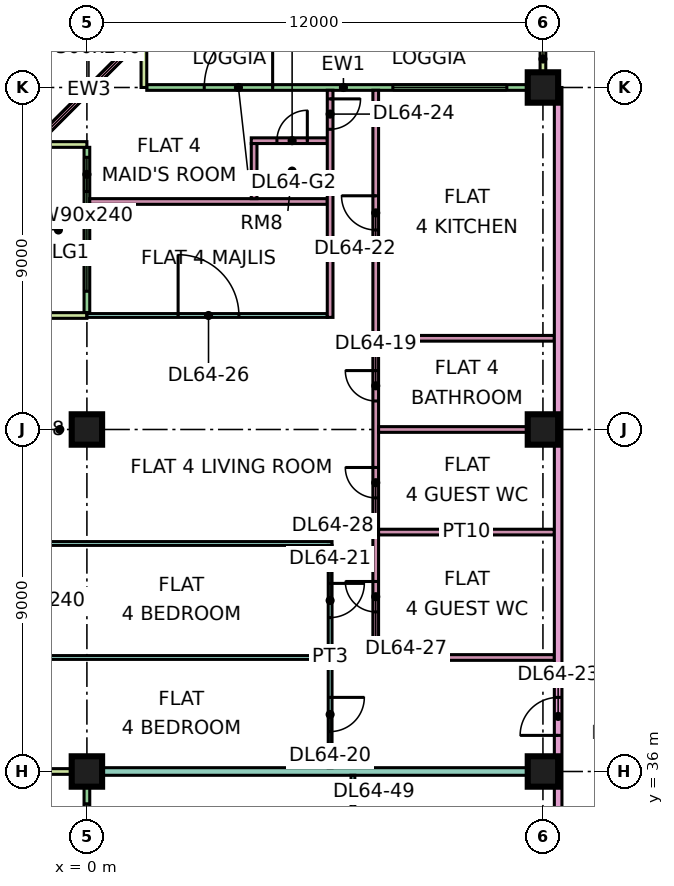
"""IFC4 building model, lengths in metres.
Left out: names, types, materials, properties, quantities, classifications, styles, units other than length and angle.
Written with IfcOpenShell. Run it as: python <this file> out.ifc"""

import sys

from ifc_helpers import new_model, si_unit, direction, frame, frame_2d, origin, origin_2d, place, context, subcontext, project, spatial, rectangle, extrude, element, fill, save


model = new_model("IFC4")
c1 = context("Model", 3, precision=1e-05, world=origin(), true_north=direction((0.0, 1.0)))
c2 = subcontext(c1, "Body", "Model", "MODEL_VIEW")
j1 = project(units=[si_unit("LENGTHUNIT", "METRE"), si_unit("PLANEANGLEUNIT", "RADIAN")], contexts=[c1])
p1 = place(None, origin())
s1 = spatial("IfcSite", under=j1, at=p1, CompositionType="ELEMENT")
p2 = place(p1, origin())
s2 = spatial("IfcBuilding", under=s1, at=p2, CompositionType="ELEMENT")
p3 = place(p2, frame((0.0, 0.0, 277.15)))
s3 = spatial("IfcBuildingStorey", under=s2, at=p3, CompositionType="ELEMENT", Elevation=277.15)
p4 = place(p3, frame((0.0, 36.0, 0.0), z_axis=(0.0, 0.0, 1.0), x_axis=(1.0, 0.0, 0.0)))
e1 = element("IfcColumn", 1, at=p4, inside=s3, PredefinedType="COLUMN", context=c2, shape_type="SweptSolid", body=[
    extrude(rectangle(XDim=0.8, YDim=0.8, at=origin_2d()), origin(), (0.0, 0.0, 1.0), 3.75),
])
for number, where, z_axis, x_axis in (
    (2, (0.0, 45.0, 0.0), (0.0, 0.0, 1.0), (1.0, 0.0, 0.0)),
    (3, (12.0, 36.0, 0.0), (0.0, 0.0, 1.0), (1.0, 0.0, 0.0)),
    (4, (12.0, 45.0, 0.0), (0.0, 0.0, 1.0), (1.0, 0.0, 0.0)),
    (5, (12.0, 54.0, 0.0), (0.0, 0.0, 1.0), (1.0, 0.0, 0.0)),
):
    element("IfcColumn", number, at=place(p3, frame(where, z_axis=z_axis, x_axis=x_axis)), inside=s3, PredefinedType="COLUMN", context=c2, shape_type="SweptSolid", body=[
        extrude(rectangle(XDim=0.8, YDim=0.8, at=origin_2d()), origin(), (0.0, 0.0, 1.0), 3.75),
    ])
p5 = place(p3, frame((11.925, 54.0, 0.0), z_axis=(0.0, 0.0, 1.0), x_axis=(-1.0, 0.0, 0.0)))
e6 = element("IfcWall", 6, at=p5, inside=s3, PredefinedType="SOLIDWALL", context=c2, shape_type="SweptSolid", body=[
    extrude(rectangle(XDim=10.35, YDim=0.15, at=frame_2d((5.175, 0.0))), origin(), (0.0, 0.0, 1.0), 3.35),
])
p6 = place(p5, frame((0.875, 0.0, 0.45)))
e7 = element("IfcOpeningElement", 7, at=p6, cuts=e6, PredefinedType="OPENING", context=c2, shape_type="SweptSolid", body=[
    extrude(rectangle(XDim=3.0, YDim=2.4, at=frame_2d((1.5, 1.2))), frame((0.0, 0.085, 0.0), z_axis=(0.0, -1.0, 0.0), x_axis=(1.0, 0.0, 0.0)), (0.0, 0.0, 1.0), 0.17),
])
p7 = place(p5, frame((7.038, 0.0, 0.0)))
e8 = element("IfcOpeningElement", 8, at=p7, cuts=e6, PredefinedType="OPENING", context=c2, shape_type="SweptSolid", body=[
    extrude(rectangle(XDim=1.8, YDim=2.4, at=frame_2d((0.9, 1.2))), frame((0.0, 0.085, 0.0), z_axis=(0.0, -1.0, 0.0), x_axis=(1.0, 0.0, 0.0)), (0.0, 0.0, 1.0), 0.17),
])
for number, where, z_axis, x_axis in (
    (9, (12.0, 55.5, 0.0), (0.0, 0.0, 1.0), (0.0, -1.0, 0.0)),
    (10, (1.5, 55.5, 0.0), (0.0, 0.0, 1.0), (0.0, -1.0, 0.0)),
):
    element("IfcWall", number, at=place(p3, frame(where, z_axis=z_axis, x_axis=x_axis)), inside=s3, PredefinedType="SOLIDWALL", context=c2, shape_type="SweptSolid", body=[
        extrude(rectangle(XDim=1.5, YDim=0.15, at=frame_2d((0.75, 0.0))), origin(), (0.0, 0.0, 1.0), 3.35),
    ])
p8 = place(p3, frame((1.553, 55.447, 0.0), z_axis=(0.0, 0.0, 1.0), x_axis=(-0.707106781187, -0.707106781187, 0.0)))
e11 = element("IfcWall", 11, at=p8, inside=s3, PredefinedType="SOLIDWALL", context=c2, shape_type="SweptSolid", body=[
    extrude(rectangle(XDim=4.243, YDim=0.15, at=frame_2d((2.121, 0.0))), origin(), (0.0, 0.0, 1.0), 3.35),
])
p9 = place(p8, frame((0.621, 0.0, 0.45)))
e12 = element("IfcOpeningElement", 12, at=p9, cuts=e11, PredefinedType="OPENING", context=c2, shape_type="SweptSolid", body=[
    extrude(rectangle(XDim=3.0, YDim=2.4, at=frame_2d((1.5, 1.2))), frame((0.0, 0.085, 0.0), z_axis=(0.0, -1.0, 0.0), x_axis=(1.0, 0.0, 0.0)), (0.0, 0.0, 1.0), 0.17),
])
p10 = place(p3, frame((0.0, 52.425, 0.0), z_axis=(0.0, 0.0, 1.0), x_axis=(0.0, -1.0, 0.0)))
e13 = element("IfcWall", 13, at=p10, inside=s3, PredefinedType="SOLIDWALL", context=c2, shape_type="SweptSolid", body=[
    extrude(rectangle(XDim=4.35, YDim=0.15, at=frame_2d((2.175, 0.0))), origin(), (0.0, 0.0, 1.0), 3.35),
])
p11 = place(p10, frame((0.262, 0.0, 0.45)))
e14 = element("IfcOpeningElement", 14, at=p11, cuts=e13, PredefinedType="OPENING", context=c2, shape_type="SweptSolid", body=[
    extrude(rectangle(XDim=0.9, YDim=2.4, at=frame_2d((0.45, 1.2))), frame((0.0, 0.085, 0.0), z_axis=(0.0, -1.0, 0.0), x_axis=(1.0, 0.0, 0.0)), (0.0, 0.0, 1.0), 0.17),
])
p12 = place(p10, frame((1.988, 0.0, 0.45)))
e15 = element("IfcOpeningElement", 15, at=p12, cuts=e13, PredefinedType="OPENING", context=c2, shape_type="SweptSolid", body=[
    extrude(rectangle(XDim=1.8, YDim=2.4, at=frame_2d((0.9, 1.2))), frame((0.0, 0.085, 0.0), z_axis=(0.0, -1.0, 0.0), x_axis=(1.0, 0.0, 0.0)), (0.0, 0.0, 1.0), 0.17),
])
for number, where, z_axis, x_axis in (
    (16, (-1.5, 52.5, 0.0), (0.0, 0.0, 1.0), (1.0, 0.0, 0.0)),
    (17, (-1.5, 48.0, 0.0), (0.0, 0.0, 1.0), (1.0, 0.0, 0.0)),
):
    element("IfcWall", number, at=place(p3, frame(where, z_axis=z_axis, x_axis=x_axis)), inside=s3, PredefinedType="SOLIDWALL", context=c2, shape_type="SweptSolid", body=[
        extrude(rectangle(XDim=1.5, YDim=0.15, at=frame_2d((0.75, 0.0))), origin(), (0.0, 0.0, 1.0), 3.35),
    ])
p13 = place(p3, frame((0.0, 35.925, 0.0), z_axis=(0.0, 0.0, 1.0), x_axis=(0.0, -1.0, 0.0)))
e18 = element("IfcWall", 18, at=p13, inside=s3, PredefinedType="SOLIDWALL", context=c2, shape_type="SweptSolid", body=[
    extrude(rectangle(XDim=11.85, YDim=0.15, at=frame_2d((5.925, 0.0))), origin(), (0.0, 0.0, 1.0), 3.35),
])
p14 = place(p13, frame((0.775, 0.0, 0.45)))
e19 = element("IfcOpeningElement", 19, at=p14, cuts=e18, PredefinedType="OPENING", context=c2, shape_type="SweptSolid", body=[
    extrude(rectangle(XDim=1.8, YDim=2.4, at=frame_2d((0.9, 1.2))), frame((0.0, 0.085, 0.0), z_axis=(0.0, -1.0, 0.0), x_axis=(1.0, 0.0, 0.0)), (0.0, 0.0, 1.0), 0.17),
])
p15 = place(p13, frame((3.525, 0.0, 0.0)))
e20 = element("IfcOpeningElement", 20, at=p15, cuts=e18, PredefinedType="OPENING", context=c2, shape_type="SweptSolid", body=[
    extrude(rectangle(XDim=1.8, YDim=2.4, at=frame_2d((0.9, 1.2))), frame((0.0, 0.085, 0.0), z_axis=(0.0, -1.0, 0.0), x_axis=(1.0, 0.0, 0.0)), (0.0, 0.0, 1.0), 0.17),
])
p16 = place(p13, frame((7.175, 0.0, 0.45)))
e21 = element("IfcOpeningElement", 21, at=p16, cuts=e18, PredefinedType="OPENING", context=c2, shape_type="SweptSolid", body=[
    extrude(rectangle(XDim=3.0, YDim=2.4, at=frame_2d((1.5, 1.2))), frame((0.0, 0.085, 0.0), z_axis=(0.0, -1.0, 0.0), x_axis=(1.0, 0.0, 0.0)), (0.0, 0.0, 1.0), 0.17),
])
p17 = place(p3, frame((-1.5, 36.0, 0.0), z_axis=(0.0, 0.0, 1.0), x_axis=(1.0, 0.0, 0.0)))
e22 = element("IfcWall", 22, at=p17, inside=s3, PredefinedType="SOLIDWALL", context=c2, shape_type="SweptSolid", body=[
    extrude(rectangle(XDim=1.5, YDim=0.15, at=frame_2d((0.75, 0.0))), origin(), (0.0, 0.0, 1.0), 3.35),
])
p18 = place(p3, frame((-1.351, 39.0, 0.0), z_axis=(0.0, 0.0, 1.0), x_axis=(1.0, 0.0, 0.0)))
e23 = element("IfcWall", 23, at=p18, inside=s3, PredefinedType="PARTITIONING", context=c2, shape_type="SweptSolid", body=[
    extrude(rectangle(XDim=7.701, YDim=0.1, at=frame_2d((3.851, 0.0))), origin(), (0.0, 0.0, 1.0), 3.35),
])
e24 = element("IfcWall", 24, at=p4, inside=s3, PredefinedType="PARTITIONING", context=c2, shape_type="SweptSolid", body=[
    extrude(rectangle(XDim=12.3, YDim=0.2, at=frame_2d((6.15, 0.0))), origin(), (0.0, 0.0, 1.0), 3.35),
])
p19 = place(p3, frame((-1.35, 42.0, 0.0), z_axis=(0.0, 0.0, 1.0), x_axis=(1.0, 0.0, 0.0)))
e25 = element("IfcWall", 25, at=p19, inside=s3, PredefinedType="PARTITIONING", context=c2, shape_type="SweptSolid", body=[
    extrude(rectangle(XDim=7.8, YDim=0.1, at=frame_2d((3.9, 0.0))), origin(), (0.0, 0.0, 1.0), 3.35),
])
p20 = place(p3, frame((0.0, 48.0, 0.0), z_axis=(0.0, 0.0, 1.0), x_axis=(1.0, 0.0, 0.0)))
e26 = element("IfcWall", 26, at=p20, inside=s3, PredefinedType="PARTITIONING", context=c2, shape_type="SweptSolid", body=[
    extrude(rectangle(XDim=6.325, YDim=0.1, at=frame_2d((3.163, 0.0))), origin(), (0.0, 0.0, 1.0), 3.35),
])
p21 = place(p20, frame((2.4, 0.0, 0.0)))
e27 = element("IfcOpeningElement", 27, at=p21, cuts=e26, PredefinedType="OPENING", context=c2, shape_type="SweptSolid", body=[
    extrude(rectangle(XDim=1.6, YDim=2.1, at=frame_2d((0.8, 1.05))), frame((0.0, 0.06, 0.0), z_axis=(0.0, -1.0, 0.0), x_axis=(1.0, 0.0, 0.0)), (0.0, 0.0, 1.0), 0.12),
])
p22 = place(p3, frame((0.074, 51.0, 0.0), z_axis=(0.0, 0.0, 1.0), x_axis=(1.0, 0.0, 0.0)))
e28 = element("IfcWall", 28, at=p22, inside=s3, PredefinedType="PARTITIONING", context=c2, shape_type="SweptSolid", body=[
    extrude(rectangle(XDim=6.251, YDim=0.15, at=frame_2d((3.125, 0.0))), origin(), (0.0, 0.0, 1.0), 3.35),
])
p23 = place(p3, frame((4.325, 52.6, 0.0), z_axis=(0.0, 0.0, 1.0), x_axis=(1.0, 0.0, 0.0)))
e29 = element("IfcWall", 29, at=p23, inside=s3, PredefinedType="PARTITIONING", context=c2, shape_type="SweptSolid", body=[
    extrude(rectangle(XDim=2.0, YDim=0.15, at=frame_2d((1.0, 0.0))), origin(), (0.0, 0.0, 1.0), 3.35),
])
p24 = place(p23, frame((0.675, 0.0, 0.0)))
e30 = element("IfcOpeningElement", 30, at=p24, cuts=e29, PredefinedType="OPENING", context=c2, shape_type="SweptSolid", body=[
    extrude(rectangle(XDim=0.8, YDim=2.1, at=frame_2d((0.4, 1.05))), frame((0.0, 0.085, 0.0), z_axis=(0.0, -1.0, 0.0), x_axis=(1.0, 0.0, 0.0)), (0.0, 0.0, 1.0), 0.17),
])
p25 = place(p3, frame((4.4, 51.075, 0.0), z_axis=(0.0, 0.0, 1.0), x_axis=(0.0, 1.0, 0.0)))
e31 = element("IfcWall", 31, at=p25, inside=s3, PredefinedType="PARTITIONING", context=c2, shape_type="SweptSolid", body=[
    extrude(rectangle(XDim=1.45, YDim=0.15, at=frame_2d((0.725, 0.0))), origin(), (0.0, 0.0, 1.0), 3.35),
])
p26 = place(p3, frame((6.4, 36.1, 0.0), z_axis=(0.0, 0.0, 1.0), x_axis=(0.0, 1.0, 0.0)))
e32 = element("IfcWall", 32, at=p26, inside=s3, PredefinedType="PARTITIONING", context=c2, shape_type="SweptSolid", body=[
    extrude(rectangle(XDim=5.85, YDim=0.1, at=frame_2d((2.925, 0.0))), origin(), (0.0, 0.0, 1.0), 3.35),
])
p27 = place(p26, frame((0.95, 0.0, 0.0)))
e33 = element("IfcOpeningElement", 33, at=p27, cuts=e32, PredefinedType="OPENING", context=c2, shape_type="SweptSolid", body=[
    extrude(rectangle(XDim=0.9, YDim=2.1, at=frame_2d((0.45, 1.05))), frame((0.0, 0.06, 0.0), z_axis=(0.0, -1.0, 0.0), x_axis=(1.0, 0.0, 0.0)), (0.0, 0.0, 1.0), 0.12),
])
p28 = place(p26, frame((3.95, 0.0, 0.0)))
e34 = element("IfcOpeningElement", 34, at=p28, cuts=e32, PredefinedType="OPENING", context=c2, shape_type="SweptSolid", body=[
    extrude(rectangle(XDim=0.9, YDim=2.1, at=frame_2d((0.45, 1.05))), frame((0.0, 0.06, 0.0), z_axis=(0.0, -1.0, 0.0), x_axis=(1.0, 0.0, 0.0)), (0.0, 0.0, 1.0), 0.12),
])
p29 = place(p3, frame((6.4, 47.95, 0.0), z_axis=(0.0, 0.0, 1.0), x_axis=(0.0, 1.0, 0.0)))
e35 = element("IfcWall", 35, at=p29, inside=s3, PredefinedType="PARTITIONING", context=c2, shape_type="SweptSolid", body=[
    extrude(rectangle(XDim=5.976, YDim=0.15, at=frame_2d((2.988, 0.0))), origin(), (0.0, 0.0, 1.0), 3.35),
])
p30 = place(p29, frame((4.95, 0.0, 0.0)))
e36 = element("IfcOpeningElement", 36, at=p30, cuts=e35, PredefinedType="OPENING", context=c2, shape_type="SweptSolid", body=[
    extrude(rectangle(XDim=0.8, YDim=2.1, at=frame_2d((0.4, 1.05))), frame((0.0, 0.085, 0.0), z_axis=(0.0, -1.0, 0.0), x_axis=(1.0, 0.0, 0.0)), (0.0, 0.0, 1.0), 0.17),
])
p31 = place(p3, frame((7.0, 30.05, 0.0), z_axis=(0.0, 0.0, 1.0), x_axis=(0.0, 1.0, 0.0)))
e37 = element("IfcWall", 37, at=p31, inside=s3, PredefinedType="PARTITIONING", context=c2, shape_type="SweptSolid", body=[
    extrude(rectangle(XDim=5.85, YDim=0.1, at=frame_2d((2.925, 0.0))), origin(), (0.0, 0.0, 1.0), 3.35),
])
p32 = place(p31, frame((1.0, 0.0, 0.0)))
e38 = element("IfcOpeningElement", 38, at=p32, cuts=e37, PredefinedType="OPENING", context=c2, shape_type="SweptSolid", body=[
    extrude(rectangle(XDim=0.9, YDim=2.1, at=frame_2d((0.45, 1.05))), frame((0.0, 0.06, 0.0), z_axis=(0.0, -1.0, 0.0), x_axis=(1.0, 0.0, 0.0)), (0.0, 0.0, 1.0), 0.12),
])
p33 = place(p31, frame((4.0, 0.0, 0.0)))
e39 = element("IfcOpeningElement", 39, at=p33, cuts=e37, PredefinedType="OPENING", context=c2, shape_type="SweptSolid", body=[
    extrude(rectangle(XDim=0.9, YDim=2.1, at=frame_2d((0.45, 1.05))), frame((0.0, 0.06, 0.0), z_axis=(0.0, -1.0, 0.0), x_axis=(1.0, 0.0, 0.0)), (0.0, 0.0, 1.0), 0.12),
])
p34 = place(p3, frame((7.6, 38.925, 0.0), z_axis=(0.0, 0.0, 1.0), x_axis=(0.0, 1.0, 0.0)))
e40 = element("IfcWall", 40, at=p34, inside=s3, PredefinedType="PARTITIONING", context=c2, shape_type="SweptSolid", body=[
    extrude(rectangle(XDim=15.001, YDim=0.15, at=frame_2d((7.5, 0.0))), origin(), (0.0, 0.0, 1.0), 3.35),
])
p35 = place(p34, frame((6.825, 0.0, 0.0)))
e41 = element("IfcOpeningElement", 41, at=p35, cuts=e40, PredefinedType="OPENING", context=c2, shape_type="SweptSolid", body=[
    extrude(rectangle(XDim=0.8, YDim=2.1, at=frame_2d((0.4, 1.05))), frame((0.0, 0.085, 0.0), z_axis=(0.0, -1.0, 0.0), x_axis=(1.0, 0.0, 0.0)), (0.0, 0.0, 1.0), 0.17),
])
p36 = place(p34, frame((11.325, 0.0, 0.0)))
e42 = element("IfcOpeningElement", 42, at=p36, cuts=e40, PredefinedType="OPENING", context=c2, shape_type="SweptSolid", body=[
    extrude(rectangle(XDim=0.9, YDim=2.1, at=frame_2d((0.45, 1.05))), frame((0.0, 0.085, 0.0), z_axis=(0.0, -1.0, 0.0), x_axis=(1.0, 0.0, 0.0)), (0.0, 0.0, 1.0), 0.17),
])
p37 = place(p34, frame((1.275, 0.0, 0.0)))
e43 = element("IfcOpeningElement", 43, at=p37, cuts=e40, PredefinedType="OPENING", context=c2, shape_type="SweptSolid", body=[
    extrude(rectangle(XDim=0.8, YDim=2.1, at=frame_2d((0.4, 1.05))), frame((0.0, 0.085, 0.0), z_axis=(0.0, -1.0, 0.0), x_axis=(1.0, 0.0, 0.0)), (0.0, 0.0, 1.0), 0.17),
])
p38 = place(p34, frame((4.275, 0.0, 0.0)))
e44 = element("IfcOpeningElement", 44, at=p38, cuts=e40, PredefinedType="OPENING", context=c2, shape_type="SweptSolid", body=[
    extrude(rectangle(XDim=0.8, YDim=2.1, at=frame_2d((0.4, 1.05))), frame((0.0, 0.085, 0.0), z_axis=(0.0, -1.0, 0.0), x_axis=(1.0, 0.0, 0.0)), (0.0, 0.0, 1.0), 0.17),
])
for number, where, z_axis, x_axis in (
    (45, (7.675, 39.0, 0.0), (0.0, 0.0, 1.0), (1.0, 0.0, 0.0)),
    (46, (7.675, 42.3, 0.0), (0.0, 0.0, 1.0), (1.0, 0.0, 0.0)),
    (47, (7.675, 45.0, 0.0), (0.0, 0.0, 1.0), (1.0, 0.0, 0.0)),
    (48, (7.675, 47.4, 0.0), (0.0, 0.0, 1.0), (1.0, 0.0, 0.0)),
):
    element("IfcWall", number, at=place(p3, frame(where, z_axis=z_axis, x_axis=x_axis)), inside=s3, PredefinedType="PARTITIONING", context=c2, shape_type="SweptSolid", body=[
        extrude(rectangle(XDim=4.625, YDim=0.15, at=frame_2d((2.312, 0.0))), origin(), (0.0, 0.0, 1.0), 3.35),
    ])
p39 = place(p3, frame((12.4, 20.0, 0.0), z_axis=(0.0, 0.0, 1.0), x_axis=(0.0, 1.0, 0.0)))
e49 = element("IfcWall", 49, at=p39, inside=s3, PredefinedType="PARTITIONING", context=c2, shape_type="SweptSolid", body=[
    extrude(rectangle(XDim=34.0, YDim=0.2, at=frame_2d((17.0, 0.0))), origin(), (0.0, 0.0, 1.0), 3.35),
])
p40 = place(p39, frame((16.95, 0.0, 0.0)))
e50 = element("IfcOpeningElement", 50, at=p40, cuts=e49, PredefinedType="OPENING", context=c2, shape_type="SweptSolid", body=[
    extrude(rectangle(XDim=1.0, YDim=2.1, at=frame_2d((0.5, 1.05))), frame((0.0, 0.11, 0.0), z_axis=(0.0, -1.0, 0.0), x_axis=(1.0, 0.0, 0.0)), (0.0, 0.0, 1.0), 0.22),
])
p41 = place(p39, frame((0.6, 0.0, 0.0)))
e51 = element("IfcOpeningElement", 51, at=p41, cuts=e49, PredefinedType="OPENING", context=c2, shape_type="SweptSolid", body=[
    extrude(rectangle(XDim=1.2, YDim=2.1, at=frame_2d((0.6, 1.05))), frame((0.0, 0.11, 0.0), z_axis=(0.0, -1.0, 0.0), x_axis=(1.0, 0.0, 0.0)), (0.0, 0.0, 1.0), 0.22),
])
p42 = place(p39, frame((13.65, 0.0, 0.0)))
e52 = element("IfcOpeningElement", 52, at=p42, cuts=e49, PredefinedType="OPENING", context=c2, shape_type="SweptSolid", body=[
    extrude(rectangle(XDim=1.0, YDim=2.1, at=frame_2d((0.5, 1.05))), frame((0.0, 0.11, 0.0), z_axis=(0.0, -1.0, 0.0), x_axis=(1.0, 0.0, 0.0)), (0.0, 0.0, 1.0), 0.22),
])
p43 = place(p6, origin())
e53 = element("IfcWindow", 53, at=p43, inside=s3, PartitioningType="SINGLE_PANEL", PredefinedType="WINDOW", context=c2, shape_type="SweptSolid", body=[
    extrude(rectangle(XDim=3.0, YDim=2.4, at=frame_2d((1.5, 1.2))), frame((0.0, 0.03, 0.0), z_axis=(0.0, -1.0, 0.0), x_axis=(1.0, 0.0, 0.0)), (0.0, 0.0, 1.0), 0.06),
])
fill(e7, e53)
p44 = place(p7, frame((1.8, 0.0, 0.0), z_axis=(0.0, 0.0, 1.0), x_axis=(-1.0, 0.0, 0.0)))
e54 = element("IfcDoor", 54, at=p44, inside=s3, OperationType="DOUBLE_DOOR_SINGLE_SWING", PredefinedType="DOOR", context=c2, shape_type="SweptSolid", body=[
    extrude(rectangle(XDim=1.8, YDim=2.4, at=frame_2d((0.9, 1.2))), frame((0.0, 0.025, 0.0), z_axis=(0.0, -1.0, 0.0), x_axis=(1.0, 0.0, 0.0)), (0.0, 0.0, 1.0), 0.05),
])
fill(e8, e54)
p45 = place(p9, origin())
e55 = element("IfcWindow", 55, at=p45, inside=s3, PartitioningType="SINGLE_PANEL", PredefinedType="WINDOW", context=c2, shape_type="SweptSolid", body=[
    extrude(rectangle(XDim=3.0, YDim=2.4, at=frame_2d((1.5, 1.2))), frame((0.0, 0.03, 0.0), z_axis=(0.0, -1.0, 0.0), x_axis=(1.0, 0.0, 0.0)), (0.0, 0.0, 1.0), 0.06),
])
fill(e12, e55)
p46 = place(p11, origin())
e56 = element("IfcWindow", 56, at=p46, inside=s3, PartitioningType="SINGLE_PANEL", PredefinedType="WINDOW", context=c2, shape_type="SweptSolid", body=[
    extrude(rectangle(XDim=0.9, YDim=2.4, at=frame_2d((0.45, 1.2))), frame((0.0, 0.03, 0.0), z_axis=(0.0, -1.0, 0.0), x_axis=(1.0, 0.0, 0.0)), (0.0, 0.0, 1.0), 0.06),
])
fill(e14, e56)
p47 = place(p12, origin())
e57 = element("IfcWindow", 57, at=p47, inside=s3, PartitioningType="SINGLE_PANEL", PredefinedType="WINDOW", context=c2, shape_type="SweptSolid", body=[
    extrude(rectangle(XDim=1.8, YDim=2.4, at=frame_2d((0.9, 1.2))), frame((0.0, 0.03, 0.0), z_axis=(0.0, -1.0, 0.0), x_axis=(1.0, 0.0, 0.0)), (0.0, 0.0, 1.0), 0.06),
])
fill(e15, e57)
p48 = place(p14, origin())
e58 = element("IfcWindow", 58, at=p48, inside=s3, PartitioningType="SINGLE_PANEL", PredefinedType="WINDOW", context=c2, shape_type="SweptSolid", body=[
    extrude(rectangle(XDim=1.8, YDim=2.4, at=frame_2d((0.9, 1.2))), frame((0.0, 0.03, 0.0), z_axis=(0.0, -1.0, 0.0), x_axis=(1.0, 0.0, 0.0)), (0.0, 0.0, 1.0), 0.06),
])
fill(e19, e58)
p49 = place(p35, frame((0.8, 0.0, 0.0), z_axis=(0.0, 0.0, 1.0), x_axis=(-1.0, 0.0, 0.0)))
e59 = element("IfcDoor", 59, at=p49, inside=s3, OperationType="SINGLE_SWING_RIGHT", PredefinedType="DOOR", context=c2, shape_type="SweptSolid", body=[
    extrude(rectangle(XDim=0.8, YDim=2.1, at=frame_2d((0.4, 1.05))), frame((0.0, 0.025, 0.0), z_axis=(0.0, -1.0, 0.0), x_axis=(1.0, 0.0, 0.0)), (0.0, 0.0, 1.0), 0.05),
])
fill(e41, e59)
p50 = place(p27, origin())
e60 = element("IfcDoor", 60, at=p50, inside=s3, OperationType="SINGLE_SWING_RIGHT", PredefinedType="DOOR", context=c2, shape_type="SweptSolid", body=[
    extrude(rectangle(XDim=0.9, YDim=2.1, at=frame_2d((0.45, 1.05))), frame((0.0, 0.025, 0.0), z_axis=(0.0, -1.0, 0.0), x_axis=(1.0, 0.0, 0.0)), (0.0, 0.0, 1.0), 0.05),
])
fill(e33, e60)
p51 = place(p28, origin())
e61 = element("IfcDoor", 61, at=p51, inside=s3, OperationType="SINGLE_SWING_RIGHT", PredefinedType="DOOR", context=c2, shape_type="SweptSolid", body=[
    extrude(rectangle(XDim=0.9, YDim=2.1, at=frame_2d((0.45, 1.05))), frame((0.0, 0.025, 0.0), z_axis=(0.0, -1.0, 0.0), x_axis=(1.0, 0.0, 0.0)), (0.0, 0.0, 1.0), 0.05),
])
fill(e34, e61)
p52 = place(p36, frame((0.9, 0.0, 0.0), z_axis=(0.0, 0.0, 1.0), x_axis=(-1.0, 0.0, 0.0)))
e62 = element("IfcDoor", 62, at=p52, inside=s3, OperationType="SINGLE_SWING_RIGHT", PredefinedType="DOOR", context=c2, shape_type="SweptSolid", body=[
    extrude(rectangle(XDim=0.9, YDim=2.1, at=frame_2d((0.45, 1.05))), frame((0.0, 0.025, 0.0), z_axis=(0.0, -1.0, 0.0), x_axis=(1.0, 0.0, 0.0)), (0.0, 0.0, 1.0), 0.05),
])
fill(e42, e62)
p53 = place(p40, origin())
e63 = element("IfcDoor", 63, at=p53, inside=s3, OperationType="SINGLE_SWING_LEFT", PredefinedType="DOOR", context=c2, shape_type="SweptSolid", body=[
    extrude(rectangle(XDim=1.0, YDim=2.1, at=frame_2d((0.5, 1.05))), frame((0.0, 0.025, 0.0), z_axis=(0.0, -1.0, 0.0), x_axis=(1.0, 0.0, 0.0)), (0.0, 0.0, 1.0), 0.05),
])
fill(e50, e63)
p54 = place(p30, origin())
e64 = element("IfcDoor", 64, at=p54, inside=s3, OperationType="SINGLE_SWING_RIGHT", PredefinedType="DOOR", context=c2, shape_type="SweptSolid", body=[
    extrude(rectangle(XDim=0.8, YDim=2.1, at=frame_2d((0.4, 1.05))), frame((0.0, 0.025, 0.0), z_axis=(0.0, -1.0, 0.0), x_axis=(1.0, 0.0, 0.0)), (0.0, 0.0, 1.0), 0.05),
])
fill(e36, e64)
p55 = place(p24, frame((0.8, 0.0, 0.0), z_axis=(0.0, 0.0, 1.0), x_axis=(-1.0, 0.0, 0.0)))
e65 = element("IfcDoor", 65, at=p55, inside=s3, OperationType="SINGLE_SWING_RIGHT", PredefinedType="DOOR", context=c2, shape_type="SweptSolid", body=[
    extrude(rectangle(XDim=0.8, YDim=2.1, at=frame_2d((0.4, 1.05))), frame((0.0, 0.025, 0.0), z_axis=(0.0, -1.0, 0.0), x_axis=(1.0, 0.0, 0.0)), (0.0, 0.0, 1.0), 0.05),
])
fill(e30, e65)
p56 = place(p21, origin())
e66 = element("IfcDoor", 66, at=p56, inside=s3, OperationType="DOUBLE_DOOR_SINGLE_SWING", PredefinedType="DOOR", context=c2, shape_type="SweptSolid", body=[
    extrude(rectangle(XDim=1.6, YDim=2.1, at=frame_2d((0.8, 1.05))), frame((0.0, 0.025, 0.0), z_axis=(0.0, -1.0, 0.0), x_axis=(1.0, 0.0, 0.0)), (0.0, 0.0, 1.0), 0.05),
])
fill(e27, e66)
p57 = place(p37, frame((0.8, 0.0, 0.0), z_axis=(0.0, 0.0, 1.0), x_axis=(-1.0, 0.0, 0.0)))
e67 = element("IfcDoor", 67, at=p57, inside=s3, OperationType="SINGLE_SWING_RIGHT", PredefinedType="DOOR", context=c2, shape_type="SweptSolid", body=[
    extrude(rectangle(XDim=0.8, YDim=2.1, at=frame_2d((0.4, 1.05))), frame((0.0, 0.025, 0.0), z_axis=(0.0, -1.0, 0.0), x_axis=(1.0, 0.0, 0.0)), (0.0, 0.0, 1.0), 0.05),
])
fill(e43, e67)
p58 = place(p38, frame((0.8, 0.0, 0.0), z_axis=(0.0, 0.0, 1.0), x_axis=(-1.0, 0.0, 0.0)))
e68 = element("IfcDoor", 68, at=p58, inside=s3, OperationType="SINGLE_SWING_RIGHT", PredefinedType="DOOR", context=c2, shape_type="SweptSolid", body=[
    extrude(rectangle(XDim=0.8, YDim=2.1, at=frame_2d((0.4, 1.05))), frame((0.0, 0.025, 0.0), z_axis=(0.0, -1.0, 0.0), x_axis=(1.0, 0.0, 0.0)), (0.0, 0.0, 1.0), 0.05),
])
fill(e44, e68)
save(model, sys.argv[1])
